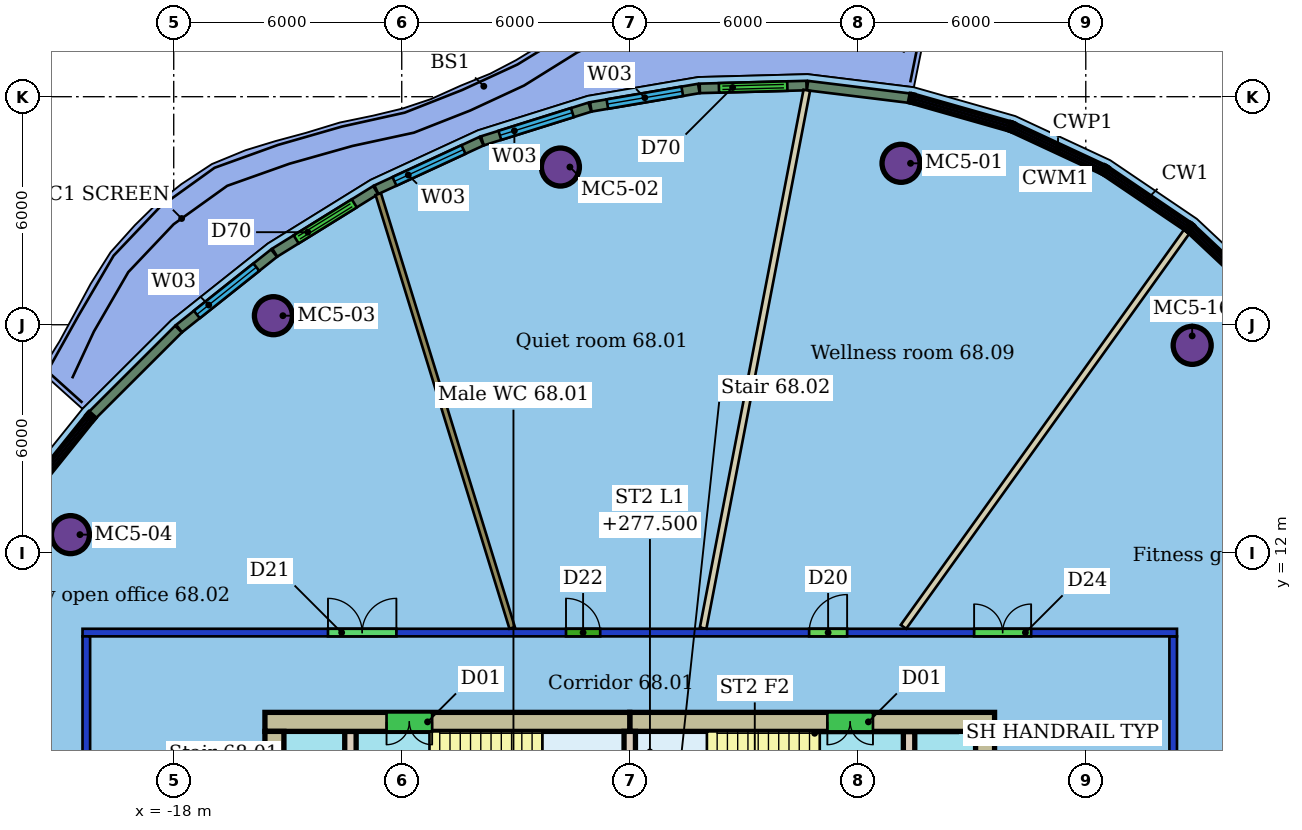
"""IFC4 building model, lengths in metres.
Left out: names, types, materials, properties, quantities, classifications, styles, units other than length and angle.
Written with IfcOpenShell. Run it as: python <this file> out.ifc"""

import sys

from ifc_helpers import new_model, si_unit, direction, frame, frame_2d, origin, origin_2d, place, context, subcontext, project, spatial, rectangle, hollow_circle, extrude, element, fill, save


model = new_model("IFC4")
c1 = context("Model", 3, precision=1e-05, world=origin(), true_north=direction((0.0, 1.0)))
c2 = subcontext(c1, "Body", "Model", "MODEL_VIEW")
j1 = project(units=[si_unit("LENGTHUNIT", "METRE"), si_unit("PLANEANGLEUNIT", "RADIAN")], contexts=[c1])
p1 = place(None, origin())
s1 = spatial("IfcSite", under=j1, at=p1, CompositionType="ELEMENT")
p2 = place(p1, origin())
s2 = spatial("IfcBuilding", under=s1, at=p2, CompositionType="ELEMENT")
p3 = place(p2, frame((0.0, 0.0, 275.7)))
s3 = spatial("IfcBuildingStorey", under=s2, at=p3, CompositionType="ELEMENT", Elevation=275.7)
for number, where, z_axis, x_axis in (
    (1, (1.138, 22.247, 0.0), (0.0, 0.0, 1.0), (1.0, 0.0, 0.0)),
    (2, (-7.825, 22.149, 0.0), (0.0, 0.0, 1.0), (1.0, 0.0, 0.0)),
    (3, (-15.377, 18.238, 0.0), (0.0, 0.0, 1.0), (1.0, 0.0, 0.0)),
    (4, (-20.718, 12.477, 0.0), (0.0, 0.0, 1.0), (1.0, 0.0, 0.0)),
    (5, (8.8, 17.457, 0.0), (0.0, 0.0, 1.0), (1.0, 0.0, 0.0)),
):
    element("IfcColumn", number, at=place(p3, frame(where, z_axis=z_axis, x_axis=x_axis)), inside=s3, PredefinedType="COLUMN", context=c2, shape_type="SweptSolid", body=[
        extrude(hollow_circle(Radius=0.5, WallThickness=0.04, at=origin_2d()), origin(), (0.0, 0.0, 1.0), 3.45),
    ])
p4 = place(p3, frame((-20.3, -9.8, 0.0), z_axis=(0.0, 0.0, 1.0), x_axis=(0.0, 1.0, 0.0)))
e6 = element("IfcWall", 6, at=p4, inside=s3, PredefinedType="PARTITIONING", context=c2, shape_type="SweptSolid", body=[
    extrude(rectangle(XDim=19.6, YDim=0.2, at=frame_2d((9.8, 0.0))), origin(), (0.0, 0.0, 1.0), 3.1),
])
p5 = place(p4, frame((5.788, 0.0, 0.0)))
e7 = element("IfcOpeningElement", 7, at=p5, cuts=e6, PredefinedType="OPENING", context=c2, shape_type="SweptSolid", body=[
    extrude(rectangle(XDim=1.8, YDim=2.4, at=frame_2d((0.9, 1.2))), frame((0.0, 0.11, 0.0), z_axis=(0.0, -1.0, 0.0), x_axis=(1.0, 0.0, 0.0)), (0.0, 0.0, 1.0), 0.22),
])
p6 = place(p3, frame((-20.4, 9.9, 0.0), z_axis=(0.0, 0.0, 1.0), x_axis=(1.0, 0.0, 0.0)))
e8 = element("IfcWall", 8, at=p6, inside=s3, PredefinedType="PARTITIONING", context=c2, shape_type="SweptSolid", body=[
    extrude(rectangle(XDim=28.8, YDim=0.2, at=frame_2d((14.4, 0.0))), origin(), (0.0, 0.0, 1.0), 3.1),
])
p7 = place(p6, frame((12.722, 0.0, 0.0)))
e9 = element("IfcOpeningElement", 9, at=p7, cuts=e8, PredefinedType="OPENING", context=c2, shape_type="SweptSolid", body=[
    extrude(rectangle(XDim=0.9, YDim=2.1, at=frame_2d((0.45, 1.05))), frame((0.0, 0.11, 0.0), z_axis=(0.0, -1.0, 0.0), x_axis=(1.0, 0.0, 0.0)), (0.0, 0.0, 1.0), 0.22),
])
p8 = place(p6, frame((6.459, 0.0, 0.0)))
e10 = element("IfcOpeningElement", 10, at=p8, cuts=e8, PredefinedType="OPENING", context=c2, shape_type="SweptSolid", body=[
    extrude(rectangle(XDim=1.8, YDim=2.1, at=frame_2d((0.9, 1.05))), frame((0.0, 0.11, 0.0), z_axis=(0.0, -1.0, 0.0), x_axis=(1.0, 0.0, 0.0)), (0.0, 0.0, 1.0), 0.22),
])
p9 = place(p6, frame((23.461, 0.0, 0.0)))
e11 = element("IfcOpeningElement", 11, at=p9, cuts=e8, PredefinedType="OPENING", context=c2, shape_type="SweptSolid", body=[
    extrude(rectangle(XDim=1.5, YDim=2.1, at=frame_2d((0.75, 1.05))), frame((0.0, 0.11, 0.0), z_axis=(0.0, -1.0, 0.0), x_axis=(1.0, 0.0, 0.0)), (0.0, 0.0, 1.0), 0.22),
])
p10 = place(p6, frame((19.12, 0.0, 0.0)))
e12 = element("IfcOpeningElement", 12, at=p10, cuts=e8, PredefinedType="OPENING", context=c2, shape_type="SweptSolid", body=[
    extrude(rectangle(XDim=1.0, YDim=2.1, at=frame_2d((0.5, 1.05))), frame((0.0, 0.11, 0.0), z_axis=(0.0, -1.0, 0.0), x_axis=(1.0, 0.0, 0.0)), (0.0, 0.0, 1.0), 0.22),
])
p11 = place(p3, frame((8.3, 9.8, 0.0), z_axis=(0.0, 0.0, 1.0), x_axis=(0.0, -1.0, 0.0)))
e13 = element("IfcWall", 13, at=p11, inside=s3, PredefinedType="PARTITIONING", context=c2, shape_type="SweptSolid", body=[
    extrude(rectangle(XDim=19.6, YDim=0.2, at=frame_2d((9.8, 0.0))), origin(), (0.0, 0.0, 1.0), 3.1),
])
p12 = place(p11, frame((7.911, 0.0, 0.0)))
e14 = element("IfcOpeningElement", 14, at=p12, cuts=e13, PredefinedType="OPENING", context=c2, shape_type="SweptSolid", body=[
    extrude(rectangle(XDim=1.5, YDim=2.4, at=frame_2d((0.75, 1.2))), frame((0.0, 0.11, 0.0), z_axis=(0.0, -1.0, 0.0), x_axis=(1.0, 0.0, 0.0)), (0.0, 0.0, 1.0), 0.22),
])
p13 = place(p3, frame((-1.341, 24.169, 0.0), z_axis=(0.0, 0.0, 1.0), x_axis=(-0.189277110702, -0.981923711581, 0.0)))
e15 = element("IfcWall", 15, at=p13, inside=s3, PredefinedType="PARTITIONING", context=c2, shape_type="SweptSolid", body=[
    extrude(rectangle(XDim=14.413, YDim=0.175, at=frame_2d((7.207, 0.0))), origin(), (0.0, 0.0, 1.0), 3.45),
])
p14 = place(p3, frame((-12.618, 21.438, 0.0), z_axis=(0.0, 0.0, 1.0), x_axis=(0.294961677419, -0.955509083606, 0.0)))
e16 = element("IfcWall", 16, at=p14, inside=s3, PredefinedType="PARTITIONING", context=c2, shape_type="SweptSolid", body=[
    extrude(rectangle(XDim=11.947, YDim=0.15, at=frame_2d((5.974, 0.0))), origin(), (0.0, 0.0, 1.0), 3.45),
])
p15 = place(p3, frame((8.658, 20.453, 0.0), z_axis=(0.0, 0.0, 1.0), x_axis=(-0.582506127463, -0.812826310763, 0.0)))
e17 = element("IfcWall", 17, at=p15, inside=s3, PredefinedType="PARTITIONING", context=c2, shape_type="SweptSolid", body=[
    extrude(rectangle(XDim=12.797, YDim=0.175, at=frame_2d((6.399, 0.0))), origin(), (0.0, 0.0, 1.0), 3.45),
])
p16 = place(p3, frame((1.363, 23.962, 0.0), z_axis=(0.0, 0.0, 1.0), x_axis=(-0.992517574304, 0.122101861978, 0.0)))
e18 = element("IfcWall", 18, at=p16, inside=s3, PredefinedType="SOLIDWALL", context=c2, shape_type="SweptSolid", body=[
    extrude(rectangle(XDim=2.705, YDim=0.25, at=frame_2d((1.353, 0.0))), origin(), (0.0, 0.0, 1.0), 3.15),
])
p17 = place(p3, frame((-1.349, 24.293, 0.0), z_axis=(0.0, 0.0, 1.0), x_axis=(-0.999646299505, -0.026594658985, 0.0)))
e19 = element("IfcWall", 19, at=p17, inside=s3, PredefinedType="SOLIDWALL", context=c2, shape_type="SweptSolid", body=[
    extrude(rectangle(XDim=2.809, YDim=0.25, at=frame_2d((1.405, 0.0))), origin(), (0.0, 0.0, 1.0), 3.15),
])
p18 = place(p17, frame((0.505, 0.0, 0.0)))
e20 = element("IfcOpeningElement", 20, at=p18, cuts=e19, PredefinedType="OPENING", context=c2, shape_type="SweptSolid", body=[
    extrude(rectangle(XDim=1.8, YDim=2.4, at=frame_2d((0.9, 1.2))), frame((0.0, 0.135, 0.0), z_axis=(0.0, -1.0, 0.0), x_axis=(1.0, 0.0, 0.0)), (0.0, 0.0, 1.0), 0.27),
])
p19 = place(p3, frame((-4.182, 24.216, 0.0), z_axis=(0.0, 0.0, 1.0), x_axis=(-0.985778528765, -0.1680496719, 0.0)))
e21 = element("IfcWall", 21, at=p19, inside=s3, PredefinedType="SOLIDWALL", context=c2, shape_type="SweptSolid", body=[
    extrude(rectangle(XDim=2.884, YDim=0.25, at=frame_2d((1.442, 0.0))), origin(), (0.0, 0.0, 1.0), 3.15),
])
p20 = place(p19, frame((0.442, 0.0, 0.9)))
e22 = element("IfcOpeningElement", 22, at=p20, cuts=e21, PredefinedType="OPENING", context=c2, shape_type="SweptSolid", body=[
    extrude(rectangle(XDim=2.0, YDim=2.1, at=frame_2d((1.0, 1.05))), frame((0.0, 0.135, 0.0), z_axis=(0.0, -1.0, 0.0), x_axis=(1.0, 0.0, 0.0)), (0.0, 0.0, 1.0), 0.27),
])
p21 = place(p3, frame((-7.049, 23.726, 0.0), z_axis=(0.0, 0.0, 1.0), x_axis=(-0.954126194686, -0.299404750486, 0.0)))
e23 = element("IfcWall", 23, at=p21, inside=s3, PredefinedType="SOLIDWALL", context=c2, shape_type="SweptSolid", body=[
    extrude(rectangle(XDim=2.965, YDim=0.25, at=frame_2d((1.482, 0.0))), origin(), (0.0, 0.0, 1.0), 3.15),
])
p22 = place(p21, frame((0.482, 0.0, 0.9)))
e24 = element("IfcOpeningElement", 24, at=p22, cuts=e23, PredefinedType="OPENING", context=c2, shape_type="SweptSolid", body=[
    extrude(rectangle(XDim=2.0, YDim=2.1, at=frame_2d((1.0, 1.05))), frame((0.0, 0.135, 0.0), z_axis=(0.0, -1.0, 0.0), x_axis=(1.0, 0.0, 0.0)), (0.0, 0.0, 1.0), 0.27),
])
p23 = place(p3, frame((-9.901, 22.83, 0.0), z_axis=(0.0, 0.0, 1.0), x_axis=(-0.907907770621, -0.419169989438, 0.0)))
e25 = element("IfcWall", 25, at=p23, inside=s3, PredefinedType="SOLIDWALL", context=c2, shape_type="SweptSolid", body=[
    extrude(rectangle(XDim=3.046, YDim=0.25, at=frame_2d((1.523, 0.0))), origin(), (0.0, 0.0, 1.0), 3.15),
])
p24 = place(p23, frame((0.523, 0.0, 0.9)))
e26 = element("IfcOpeningElement", 26, at=p24, cuts=e25, PredefinedType="OPENING", context=c2, shape_type="SweptSolid", body=[
    extrude(rectangle(XDim=2.0, YDim=2.1, at=frame_2d((1.0, 1.05))), frame((0.0, 0.135, 0.0), z_axis=(0.0, -1.0, 0.0), x_axis=(1.0, 0.0, 0.0)), (0.0, 0.0, 1.0), 0.27),
])
p25 = place(p3, frame((-12.687, 21.542, 0.0), z_axis=(0.0, 0.0, 1.0), x_axis=(-0.850108496559, -0.526607580726, 0.0)))
e27 = element("IfcWall", 27, at=p25, inside=s3, PredefinedType="SOLIDWALL", context=c2, shape_type="SweptSolid", body=[
    extrude(rectangle(XDim=3.123, YDim=0.25, at=frame_2d((1.562, 0.0))), origin(), (0.0, 0.0, 1.0), 3.15),
])
p26 = place(p25, frame((0.661, 0.0, 0.0)))
e28 = element("IfcOpeningElement", 28, at=p26, cuts=e27, PredefinedType="OPENING", context=c2, shape_type="SweptSolid", body=[
    extrude(rectangle(XDim=1.8, YDim=2.4, at=frame_2d((0.9, 1.2))), frame((0.0, 0.135, 0.0), z_axis=(0.0, -1.0, 0.0), x_axis=(1.0, 0.0, 0.0)), (0.0, 0.0, 1.0), 0.27),
])
p27 = place(p3, frame((-15.36, 19.884, 0.0), z_axis=(0.0, 0.0, 1.0), x_axis=(-0.782888253788, -0.622162343831, 0.0)))
e29 = element("IfcWall", 29, at=p27, inside=s3, PredefinedType="SOLIDWALL", context=c2, shape_type="SweptSolid", body=[
    extrude(rectangle(XDim=3.19, YDim=0.25, at=frame_2d((1.595, 0.0))), origin(), (0.0, 0.0, 1.0), 3.15),
])
p28 = place(p27, frame((0.595, 0.0, 0.9)))
e30 = element("IfcOpeningElement", 30, at=p28, cuts=e29, PredefinedType="OPENING", context=c2, shape_type="SweptSolid", body=[
    extrude(rectangle(XDim=2.0, YDim=2.1, at=frame_2d((1.0, 1.05))), frame((0.0, 0.135, 0.0), z_axis=(0.0, -1.0, 0.0), x_axis=(1.0, 0.0, 0.0)), (0.0, 0.0, 1.0), 0.27),
])
p29 = place(p3, frame((-17.874, 17.885, 0.0), z_axis=(0.0, 0.0, 1.0), x_axis=(-0.707869406471, -0.706343332511, 0.0)))
e31 = element("IfcWall", 31, at=p29, inside=s3, PredefinedType="SOLIDWALL", context=c2, shape_type="SweptSolid", body=[
    extrude(rectangle(XDim=3.2, YDim=0.25, at=frame_2d((1.6, 0.0))), origin(), (0.0, 0.0, 1.0), 3.15),
])
p30 = place(p3, frame((3.6, 7.55, 0.0), z_axis=(0.0, 0.0, 1.0), x_axis=(-1.0, 0.0, 0.0)))
e32 = element("IfcWall", 32, at=p30, inside=s3, PredefinedType="SHEAR", context=c2, shape_type="SweptSolid", body=[
    extrude(rectangle(XDim=9.6, YDim=0.5, at=frame_2d((4.8, 0.0))), origin(), (0.0, 0.0, 1.0), 3.3),
])
p31 = place(p30, frame((3.2, 0.0, 0.0)))
e33 = element("IfcOpeningElement", 33, at=p31, cuts=e32, PredefinedType="OPENING", context=c2, shape_type="SweptSolid", body=[
    extrude(rectangle(XDim=1.2, YDim=2.1, at=frame_2d((0.6, 1.05))), frame((0.0, 0.26, 0.0), z_axis=(0.0, -1.0, 0.0), x_axis=(1.0, 0.0, 0.0)), (0.0, 0.0, 1.0), 0.52),
])
p32 = place(p3, frame((-6.0, 7.55, 0.0), z_axis=(0.0, 0.0, 1.0), x_axis=(-1.0, 0.0, 0.0)))
e34 = element("IfcWall", 34, at=p32, inside=s3, PredefinedType="SHEAR", context=c2, shape_type="SweptSolid", body=[
    extrude(rectangle(XDim=9.6, YDim=0.5, at=frame_2d((4.8, 0.0))), origin(), (0.0, 0.0, 1.0), 3.3),
])
p33 = place(p32, frame((5.2, 0.0, 0.0)))
e35 = element("IfcOpeningElement", 35, at=p33, cuts=e34, PredefinedType="OPENING", context=c2, shape_type="SweptSolid", body=[
    extrude(rectangle(XDim=1.2, YDim=2.1, at=frame_2d((0.6, 1.05))), frame((0.0, 0.26, 0.0), z_axis=(0.0, -1.0, 0.0), x_axis=(1.0, 0.0, 0.0)), (0.0, 0.0, 1.0), 0.52),
])
p34 = place(p3, frame((-15.35, 7.3, 0.0), z_axis=(0.0, 0.0, 1.0), x_axis=(0.0, -1.0, 0.0)))
e36 = element("IfcWall", 36, at=p34, inside=s3, PredefinedType="SHEAR", context=c2, shape_type="SweptSolid", body=[
    extrude(rectangle(XDim=14.6, YDim=0.5, at=frame_2d((7.3, 0.0))), origin(), (0.0, 0.0, 1.0), 3.3),
])
p35 = place(p34, frame((10.6, 0.0, 0.0)))
e37 = element("IfcOpeningElement", 37, at=p35, cuts=e36, PredefinedType="OPENING", context=c2, shape_type="SweptSolid", body=[
    extrude(rectangle(XDim=1.2, YDim=2.1, at=frame_2d((0.6, 1.05))), frame((0.0, 0.26, 0.0), z_axis=(0.0, -1.0, 0.0), x_axis=(1.0, 0.0, 0.0)), (0.0, 0.0, 1.0), 0.52),
])
p36 = place(p34, frame((2.8, 0.0, 0.0)))
e38 = element("IfcOpeningElement", 38, at=p36, cuts=e36, PredefinedType="OPENING", context=c2, shape_type="SweptSolid", body=[
    extrude(rectangle(XDim=1.2, YDim=2.1, at=frame_2d((0.6, 1.05))), frame((0.0, 0.26, 0.0), z_axis=(0.0, -1.0, 0.0), x_axis=(1.0, 0.0, 0.0)), (0.0, 0.0, 1.0), 0.52),
])
p37 = place(p3, frame((3.35, -7.3, 0.0), z_axis=(0.0, 0.0, 1.0), x_axis=(0.0, 1.0, 0.0)))
e39 = element("IfcWall", 39, at=p37, inside=s3, PredefinedType="SHEAR", context=c2, shape_type="SweptSolid", body=[
    extrude(rectangle(XDim=14.6, YDim=0.5, at=frame_2d((7.3, 0.0))), origin(), (0.0, 0.0, 1.0), 3.3),
])
p38 = place(p37, frame((2.8, 0.0, 0.0)))
e40 = element("IfcOpeningElement", 40, at=p38, cuts=e39, PredefinedType="OPENING", context=c2, shape_type="SweptSolid", body=[
    extrude(rectangle(XDim=1.2, YDim=2.1, at=frame_2d((0.6, 1.05))), frame((0.0, 0.26, 0.0), z_axis=(0.0, -1.0, 0.0), x_axis=(1.0, 0.0, 0.0)), (0.0, 0.0, 1.0), 0.52),
])
p39 = place(p37, frame((10.6, 0.0, 0.0)))
e41 = element("IfcOpeningElement", 41, at=p39, cuts=e39, PredefinedType="OPENING", context=c2, shape_type="SweptSolid", body=[
    extrude(rectangle(XDim=1.2, YDim=2.1, at=frame_2d((0.6, 1.05))), frame((0.0, 0.26, 0.0), z_axis=(0.0, -1.0, 0.0), x_axis=(1.0, 0.0, 0.0)), (0.0, 0.0, 1.0), 0.52),
])
p40 = place(p3, frame((-13.35, 7.3, 0.0), z_axis=(0.0, 0.0, 1.0), x_axis=(0.0, -1.0, 0.0)))
e42 = element("IfcWall", 42, at=p40, inside=s3, PredefinedType="SHEAR", context=c2, shape_type="SweptSolid", body=[
    extrude(rectangle(XDim=14.6, YDim=0.3, at=frame_2d((7.3, 0.0))), origin(), (0.0, 0.0, 1.0), 3.3),
])
p41 = place(p40, frame((6.55, 0.0, 0.0)))
e43 = element("IfcOpeningElement", 43, at=p41, cuts=e42, PredefinedType="OPENING", context=c2, shape_type="SweptSolid", body=[
    extrude(rectangle(XDim=1.5, YDim=2.1, at=frame_2d((0.75, 1.05))), frame((0.0, 0.16, 0.0), z_axis=(0.0, -1.0, 0.0), x_axis=(1.0, 0.0, 0.0)), (0.0, 0.0, 1.0), 0.32),
])
p42 = place(p3, frame((1.35, -7.3, 0.0), z_axis=(0.0, 0.0, 1.0), x_axis=(0.0, 1.0, 0.0)))
e44 = element("IfcWall", 44, at=p42, inside=s3, PredefinedType="SHEAR", context=c2, shape_type="SweptSolid", body=[
    extrude(rectangle(XDim=14.6, YDim=0.3, at=frame_2d((7.3, 0.0))), origin(), (0.0, 0.0, 1.0), 3.3),
])
p43 = place(p42, frame((1.21, 0.0, 0.0)))
e45 = element("IfcOpeningElement", 45, at=p43, cuts=e44, PredefinedType="OPENING", context=c2, shape_type="SweptSolid", body=[
    extrude(rectangle(XDim=1.0, YDim=2.1, at=frame_2d((0.5, 1.05))), frame((0.0, 0.16, 0.0), z_axis=(0.0, -1.0, 0.0), x_axis=(1.0, 0.0, 0.0)), (0.0, 0.0, 1.0), 0.32),
])
p44 = place(p42, frame((6.55, 0.0, 0.0)))
e46 = element("IfcOpeningElement", 46, at=p44, cuts=e44, PredefinedType="OPENING", context=c2, shape_type="SweptSolid", body=[
    extrude(rectangle(XDim=1.5, YDim=2.1, at=frame_2d((0.75, 1.05))), frame((0.0, 0.16, 0.0), z_axis=(0.0, -1.0, 0.0), x_axis=(1.0, 0.0, 0.0)), (0.0, 0.0, 1.0), 0.32),
])
p45 = place(p3, frame((-6.0, 3.88, 0.0), z_axis=(0.0, 0.0, 1.0), x_axis=(0.0, 1.0, 0.0)))
e47 = element("IfcWall", 47, at=p45, inside=s3, PredefinedType="SHEAR", context=c2, shape_type="SweptSolid", body=[
    extrude(rectangle(XDim=3.42, YDim=0.3, at=frame_2d((1.71, 0.0))), origin(), (0.0, 0.0, 1.0), 3.3),
])
p46 = place(p7, origin())
e48 = element("IfcDoor", 48, at=p46, inside=s3, OperationType="SINGLE_SWING_LEFT", PredefinedType="DOOR", context=c2, shape_type="SweptSolid", body=[
    extrude(rectangle(XDim=0.9, YDim=2.1, at=frame_2d((0.45, 1.05))), frame((0.0, 0.025, 0.0), z_axis=(0.0, -1.0, 0.0), x_axis=(1.0, 0.0, 0.0)), (0.0, 0.0, 1.0), 0.05),
])
fill(e9, e48)
p47 = place(p8, origin())
e49 = element("IfcDoor", 49, at=p47, inside=s3, OperationType="DOUBLE_DOOR_SINGLE_SWING", PredefinedType="DOOR", context=c2, shape_type="SweptSolid", body=[
    extrude(rectangle(XDim=1.8, YDim=2.1, at=frame_2d((0.9, 1.05))), frame((0.0, 0.025, 0.0), z_axis=(0.0, -1.0, 0.0), x_axis=(1.0, 0.0, 0.0)), (0.0, 0.0, 1.0), 0.05),
])
fill(e10, e49)
p48 = place(p9, origin())
e50 = element("IfcDoor", 50, at=p48, inside=s3, OperationType="DOUBLE_DOOR_SINGLE_SWING", PredefinedType="DOOR", context=c2, shape_type="SweptSolid", body=[
    extrude(rectangle(XDim=1.5, YDim=2.1, at=frame_2d((0.75, 1.05))), frame((0.0, 0.025, 0.0), z_axis=(0.0, -1.0, 0.0), x_axis=(1.0, 0.0, 0.0)), (0.0, 0.0, 1.0), 0.05),
])
fill(e11, e50)
p49 = place(p10, origin())
e51 = element("IfcDoor", 51, at=p49, inside=s3, OperationType="SINGLE_SWING_RIGHT", PredefinedType="DOOR", context=c2, shape_type="SweptSolid", body=[
    extrude(rectangle(XDim=1.0, YDim=2.1, at=frame_2d((0.5, 1.05))), frame((0.0, 0.025, 0.0), z_axis=(0.0, -1.0, 0.0), x_axis=(1.0, 0.0, 0.0)), (0.0, 0.0, 1.0), 0.05),
])
fill(e12, e51)
p50 = place(p18, origin())
e52 = element("IfcDoor", 52, at=p50, inside=s3, OperationType="DOUBLE_DOOR_SLIDING", PredefinedType="DOOR", context=c2, shape_type="SweptSolid", body=[
    extrude(rectangle(XDim=1.8, YDim=2.4, at=frame_2d((0.9, 1.2))), frame((0.0, 0.025, 0.0), z_axis=(0.0, -1.0, 0.0), x_axis=(1.0, 0.0, 0.0)), (0.0, 0.0, 1.0), 0.05),
])
fill(e20, e52)
p51 = place(p20, origin())
e53 = element("IfcWindow", 53, at=p51, inside=s3, PartitioningType="SINGLE_PANEL", PredefinedType="WINDOW", context=c2, shape_type="SweptSolid", body=[
    extrude(rectangle(XDim=2.0, YDim=2.1, at=frame_2d((1.0, 1.05))), frame((0.0, 0.03, 0.0), z_axis=(0.0, -1.0, 0.0), x_axis=(1.0, 0.0, 0.0)), (0.0, 0.0, 1.0), 0.06),
])
fill(e22, e53)
p52 = place(p22, origin())
e54 = element("IfcWindow", 54, at=p52, inside=s3, PartitioningType="SINGLE_PANEL", PredefinedType="WINDOW", context=c2, shape_type="SweptSolid", body=[
    extrude(rectangle(XDim=2.0, YDim=2.1, at=frame_2d((1.0, 1.05))), frame((0.0, 0.03, 0.0), z_axis=(0.0, -1.0, 0.0), x_axis=(1.0, 0.0, 0.0)), (0.0, 0.0, 1.0), 0.06),
])
fill(e24, e54)
p53 = place(p24, origin())
e55 = element("IfcWindow", 55, at=p53, inside=s3, PartitioningType="SINGLE_PANEL", PredefinedType="WINDOW", context=c2, shape_type="SweptSolid", body=[
    extrude(rectangle(XDim=2.0, YDim=2.1, at=frame_2d((1.0, 1.05))), frame((0.0, 0.03, 0.0), z_axis=(0.0, -1.0, 0.0), x_axis=(1.0, 0.0, 0.0)), (0.0, 0.0, 1.0), 0.06),
])
fill(e26, e55)
p54 = place(p26, origin())
e56 = element("IfcDoor", 56, at=p54, inside=s3, OperationType="DOUBLE_DOOR_SLIDING", PredefinedType="DOOR", context=c2, shape_type="SweptSolid", body=[
    extrude(rectangle(XDim=1.8, YDim=2.4, at=frame_2d((0.9, 1.2))), frame((0.0, 0.025, 0.0), z_axis=(0.0, -1.0, 0.0), x_axis=(1.0, 0.0, 0.0)), (0.0, 0.0, 1.0), 0.05),
])
fill(e28, e56)
p55 = place(p28, origin())
e57 = element("IfcWindow", 57, at=p55, inside=s3, PartitioningType="SINGLE_PANEL", PredefinedType="WINDOW", context=c2, shape_type="SweptSolid", body=[
    extrude(rectangle(XDim=2.0, YDim=2.1, at=frame_2d((1.0, 1.05))), frame((0.0, 0.03, 0.0), z_axis=(0.0, -1.0, 0.0), x_axis=(1.0, 0.0, 0.0)), (0.0, 0.0, 1.0), 0.06),
])
fill(e30, e57)
p56 = place(p31, origin())
e58 = element("IfcDoor", 58, at=p56, inside=s3, OperationType="DOUBLE_DOOR_SINGLE_SWING", PredefinedType="NOTDEFINED", context=c2, shape_type="SweptSolid", body=[
    extrude(rectangle(XDim=1.2, YDim=2.1, at=frame_2d((0.6, 1.05))), frame((0.0, 0.025, 0.0), z_axis=(0.0, -1.0, 0.0), x_axis=(1.0, 0.0, 0.0)), (0.0, 0.0, 1.0), 0.05),
])
fill(e33, e58)
p57 = place(p33, origin())
e59 = element("IfcDoor", 59, at=p57, inside=s3, OperationType="DOUBLE_DOOR_SINGLE_SWING", PredefinedType="NOTDEFINED", context=c2, shape_type="SweptSolid", body=[
    extrude(rectangle(XDim=1.2, YDim=2.1, at=frame_2d((0.6, 1.05))), frame((0.0, 0.025, 0.0), z_axis=(0.0, -1.0, 0.0), x_axis=(1.0, 0.0, 0.0)), (0.0, 0.0, 1.0), 0.05),
])
fill(e35, e59)
save(model, sys.argv[1])
